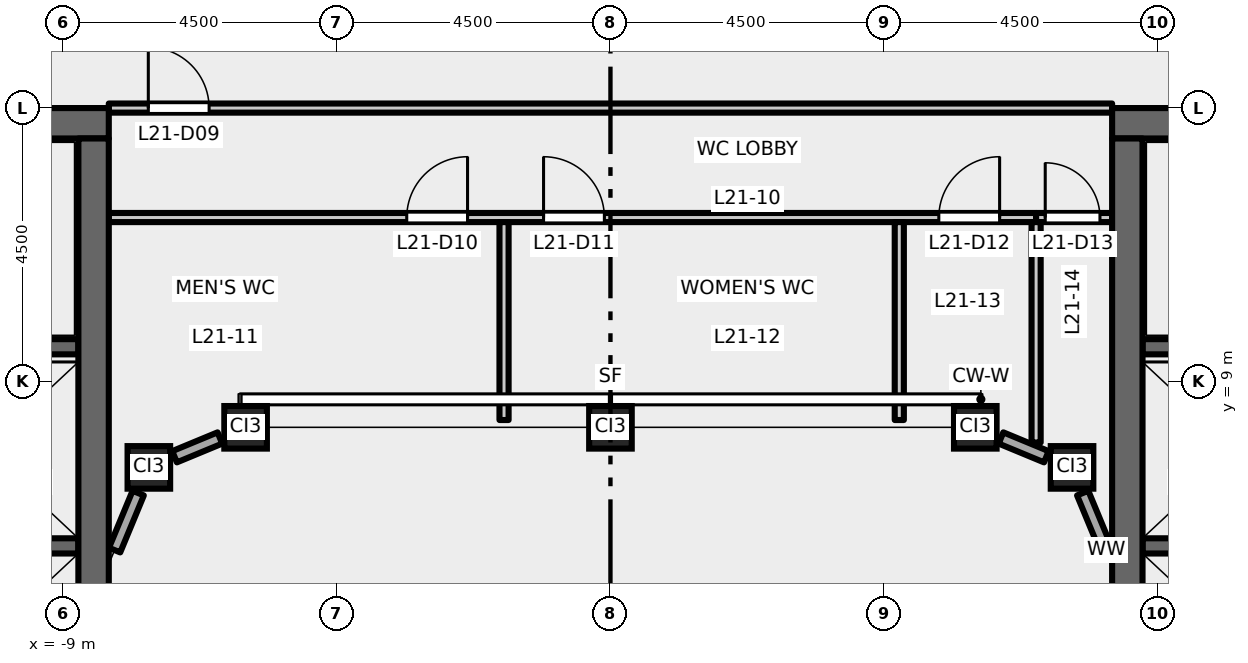
"""IFC4 building model, lengths in metres.
Left out: names, types, materials, properties, quantities, classifications, styles, units other than length and angle.
Written with IfcOpenShell. Run it as: python <this file> out.ifc"""

import sys

from ifc_helpers import new_model, si_unit, direction, frame, frame_2d, origin, origin_2d, place, context, subcontext, project, spatial, rectangle, hollow_rectangle, extrude, element, fill, save


model = new_model("IFC4")
c1 = context("Model", 3, precision=1e-05, world=origin(), true_north=direction((0.0, 1.0)))
c2 = subcontext(c1, "Body", "Model", "MODEL_VIEW")
j1 = project(units=[si_unit("LENGTHUNIT", "METRE"), si_unit("PLANEANGLEUNIT", "RADIAN")], contexts=[c1])
p1 = place(None, origin())
s1 = spatial("IfcSite", under=j1, at=p1, CompositionType="ELEMENT")
p2 = place(p1, origin())
s2 = spatial("IfcBuilding", under=s1, at=p2, CompositionType="ELEMENT")
p3 = place(p2, frame((0.0, 0.0, 99.2)))
s3 = spatial("IfcBuildingStorey", under=s2, at=p3, CompositionType="ELEMENT", Elevation=99.2)
for number, where, z_axis, x_axis in (
    (1, (-7.591, 7.591, 0.0), (0.0, 0.0, 1.0), (1.0, 0.0, 0.0)),
    (2, (-6.0, 8.25, 0.0), (0.0, 0.0, 1.0), (1.0, 0.0, 0.0)),
    (3, (0.0, 8.25, 0.0), (0.0, 0.0, 1.0), (1.0, 0.0, 0.0)),
    (4, (6.0, 8.25, 0.0), (0.0, 0.0, 1.0), (1.0, 0.0, 0.0)),
    (5, (7.591, 7.591, 0.0), (0.0, 0.0, 1.0), (1.0, 0.0, 0.0)),
):
    element("IfcColumn", number, at=place(p3, frame(where, z_axis=z_axis, x_axis=x_axis)), inside=s3, PredefinedType="COLUMN", context=c2, shape_type="SweptSolid", body=[
        extrude(hollow_rectangle(XDim=0.7, YDim=0.7, WallThickness=0.04, at=origin_2d()), origin(), (0.0, 0.0, 1.0), 5.5),
    ])
p4 = place(p3, frame((-8.75, 6.3, 0.0), z_axis=(0.0, 0.0, 1.0), x_axis=(-1.0, 0.0, 0.0)))
e6 = element("IfcWall", 6, at=p4, inside=s3, PredefinedType="SHEAR", context=c2, shape_type="SweptSolid", body=[
    extrude(rectangle(XDim=3.1, YDim=0.25, at=frame_2d((1.55, 0.0))), origin(), (0.0, 0.0, 1.0), 5.35),
])
p5 = place(p3, frame((-8.75, 9.575, 0.0), z_axis=(0.0, 0.0, 1.0), x_axis=(-1.0, 0.0, 0.0)))
e7 = element("IfcWall", 7, at=p5, inside=s3, PredefinedType="SHEAR", context=c2, shape_type="SweptSolid", body=[
    extrude(rectangle(XDim=8.0, YDim=0.25, at=frame_2d((4.0, 0.0))), origin(), (0.0, 0.0, 1.0), 5.35),
])
p6 = place(p5, frame((6.65, 0.0, 0.0)))
e8 = element("IfcOpeningElement", 8, at=p6, cuts=e7, PredefinedType="OPENING", context=c2, shape_type="SweptSolid", body=[
    extrude(rectangle(XDim=1.1, YDim=2.1, at=frame_2d((0.55, 1.05))), frame((0.0, 0.135, 0.0), z_axis=(0.0, -1.0, 0.0), x_axis=(1.0, 0.0, 0.0)), (0.0, 0.0, 1.0), 0.27),
])
p7 = place(p3, frame((-8.25, 13.25, 0.0), z_axis=(0.0, 0.0, 1.0), x_axis=(-1.0, 0.0, 0.0)))
e9 = element("IfcWall", 9, at=p7, inside=s3, PredefinedType="SHEAR", context=c2, shape_type="SweptSolid", body=[
    extrude(rectangle(XDim=13.5, YDim=0.5, at=frame_2d((6.75, 0.0))), origin(), (0.0, 0.0, 1.0), 5.35),
])
p8 = place(p3, frame((-8.5, -13.0, 0.0), z_axis=(0.0, 0.0, 1.0), x_axis=(0.0, 1.0, 0.0)))
e10 = element("IfcWall", 10, at=p8, inside=s3, PredefinedType="SHEAR", context=c2, shape_type="SweptSolid", body=[
    extrude(rectangle(XDim=26.0, YDim=0.5, at=frame_2d((13.0, 0.0))), origin(), (0.0, 0.0, 1.0), 5.35),
])
p9 = place(p3, frame((8.75, 6.3, 0.0), z_axis=(0.0, 0.0, 1.0), x_axis=(1.0, 0.0, 0.0)))
e11 = element("IfcWall", 11, at=p9, inside=s3, PredefinedType="SHEAR", context=c2, shape_type="SweptSolid", body=[
    extrude(rectangle(XDim=3.1, YDim=0.25, at=frame_2d((1.55, 0.0))), origin(), (0.0, 0.0, 1.0), 5.35),
])
p10 = place(p3, frame((8.75, 9.575, 0.0), z_axis=(0.0, 0.0, 1.0), x_axis=(1.0, 0.0, 0.0)))
e12 = element("IfcWall", 12, at=p10, inside=s3, PredefinedType="SHEAR", context=c2, shape_type="SweptSolid", body=[
    extrude(rectangle(XDim=8.0, YDim=0.25, at=frame_2d((4.0, 0.0))), origin(), (0.0, 0.0, 1.0), 5.35),
])
p11 = place(p10, frame((6.65, 0.0, 0.0)))
e13 = element("IfcOpeningElement", 13, at=p11, cuts=e12, PredefinedType="OPENING", context=c2, shape_type="SweptSolid", body=[
    extrude(rectangle(XDim=1.1, YDim=2.1, at=frame_2d((0.55, 1.05))), frame((0.0, 0.135, 0.0), z_axis=(0.0, -1.0, 0.0), x_axis=(1.0, 0.0, 0.0)), (0.0, 0.0, 1.0), 0.27),
])
p12 = place(p3, frame((8.25, 13.25, 0.0), z_axis=(0.0, 0.0, 1.0), x_axis=(1.0, 0.0, 0.0)))
e14 = element("IfcWall", 14, at=p12, inside=s3, PredefinedType="SHEAR", context=c2, shape_type="SweptSolid", body=[
    extrude(rectangle(XDim=13.5, YDim=0.5, at=frame_2d((6.75, 0.0))), origin(), (0.0, 0.0, 1.0), 5.35),
])
p13 = place(p3, frame((8.5, -13.0, 0.0), z_axis=(0.0, 0.0, 1.0), x_axis=(0.0, 1.0, 0.0)))
e15 = element("IfcWall", 15, at=p13, inside=s3, PredefinedType="SHEAR", context=c2, shape_type="SweptSolid", body=[
    extrude(rectangle(XDim=26.0, YDim=0.5, at=frame_2d((13.0, 0.0))), origin(), (0.0, 0.0, 1.0), 5.35),
])
p14 = place(p3, frame((8.154, 6.231, 0.0), z_axis=(0.0, 0.0, 1.0), x_axis=(-0.382769662028, 0.923843810301, 0.0)))
e16 = element("IfcWall", 16, at=p14, inside=s3, PredefinedType="STANDARD", context=c2, shape_type="SweptSolid", body=[
    extrude(rectangle(XDim=1.015, YDim=0.2, at=frame_2d((0.507, 0.0))), origin(), (0.0, 0.0, 1.0), 4.826),
])
for number, where, z_axis, x_axis in (
    (17, (7.168, 7.766, 0.0), (0.0, 0.0, 1.0), (-0.924, 0.383, 0.0)),
    (18, (-6.423, 8.075, 0.0), (0.0, 0.0, 1.0), (-0.924, -0.383, 0.0)),
):
    element("IfcWall", number, at=place(p3, frame(where, z_axis=z_axis, x_axis=x_axis)), inside=s3, PredefinedType="STANDARD", context=c2, shape_type="SweptSolid", body=[
        extrude(rectangle(XDim=0.807, YDim=0.2, at=frame_2d((0.404, 0.0))), origin(), (0.0, 0.0, 1.0), 4.826),
    ])
p15 = place(p3, frame((-7.766, 7.168, 0.0), z_axis=(0.0, 0.0, 1.0), x_axis=(-0.382769662028, -0.923843810301, 0.0)))
e19 = element("IfcWall", 19, at=p15, inside=s3, PredefinedType="STANDARD", context=c2, shape_type="SweptSolid", body=[
    extrude(rectangle(XDim=1.015, YDim=0.2, at=frame_2d((0.507, 0.0))), origin(), (0.0, 0.0, 1.0), 4.826),
])
p16 = place(p3, frame((-8.25, 11.7, 0.0), z_axis=(0.0, 0.0, 1.0), x_axis=(1.0, 0.0, 0.0)))
e20 = element("IfcWall", 20, at=p16, inside=s3, PredefinedType="PARTITIONING", context=c2, shape_type="SweptSolid", body=[
    extrude(rectangle(XDim=15.25, YDim=0.15, at=frame_2d((7.625, 0.0))), origin(), (0.0, 0.0, 1.0), 5.35),
])
p17 = place(p16, frame((4.9, 0.0, 0.0)))
e21 = element("IfcOpeningElement", 21, at=p17, cuts=e20, PredefinedType="OPENING", context=c2, shape_type="SweptSolid", body=[
    extrude(rectangle(XDim=1.0, YDim=2.1, at=frame_2d((0.5, 1.05))), frame((0.0, 0.085, 0.0), z_axis=(0.0, -1.0, 0.0), x_axis=(1.0, 0.0, 0.0)), (0.0, 0.0, 1.0), 0.17),
])
p18 = place(p16, frame((7.15, 0.0, 0.0)))
e22 = element("IfcOpeningElement", 22, at=p18, cuts=e20, PredefinedType="OPENING", context=c2, shape_type="SweptSolid", body=[
    extrude(rectangle(XDim=1.0, YDim=2.1, at=frame_2d((0.5, 1.05))), frame((0.0, 0.085, 0.0), z_axis=(0.0, -1.0, 0.0), x_axis=(1.0, 0.0, 0.0)), (0.0, 0.0, 1.0), 0.17),
])
p19 = place(p16, frame((13.65, 0.0, 0.0)))
e23 = element("IfcOpeningElement", 23, at=p19, cuts=e20, PredefinedType="OPENING", context=c2, shape_type="SweptSolid", body=[
    extrude(rectangle(XDim=1.0, YDim=2.1, at=frame_2d((0.5, 1.05))), frame((0.0, 0.085, 0.0), z_axis=(0.0, -1.0, 0.0), x_axis=(1.0, 0.0, 0.0)), (0.0, 0.0, 1.0), 0.17),
])
p20 = place(p3, frame((7.0, 11.7, 0.0), z_axis=(0.0, 0.0, 1.0), x_axis=(1.0, 0.0, 0.0)))
e24 = element("IfcWall", 24, at=p20, inside=s3, PredefinedType="PARTITIONING", context=c2, shape_type="SweptSolid", body=[
    extrude(rectangle(XDim=1.25, YDim=0.15, at=frame_2d((0.625, 0.0))), origin(), (0.0, 0.0, 1.0), 5.35),
])
p21 = place(p20, frame((0.15, 0.0, 0.0)))
e25 = element("IfcOpeningElement", 25, at=p21, cuts=e24, PredefinedType="OPENING", context=c2, shape_type="SweptSolid", body=[
    extrude(rectangle(XDim=0.9, YDim=2.1, at=frame_2d((0.45, 1.05))), frame((0.0, 0.085, 0.0), z_axis=(0.0, -1.0, 0.0), x_axis=(1.0, 0.0, 0.0)), (0.0, 0.0, 1.0), 0.17),
])
p22 = place(p3, frame((-8.25, 13.5, 0.0), z_axis=(0.0, 0.0, 1.0), x_axis=(1.0, 0.0, 0.0)))
e26 = element("IfcWall", 26, at=p22, inside=s3, PredefinedType="PARTITIONING", context=c2, shape_type="SweptSolid", body=[
    extrude(rectangle(XDim=16.5, YDim=0.15, at=frame_2d((8.25, 0.0))), origin(), (0.0, 0.0, 1.0), 5.35),
])
p23 = place(p22, frame((0.65, 0.0, 0.0)))
e27 = element("IfcOpeningElement", 27, at=p23, cuts=e26, PredefinedType="OPENING", context=c2, shape_type="SweptSolid", body=[
    extrude(rectangle(XDim=1.0, YDim=2.1, at=frame_2d((0.5, 1.05))), frame((0.0, 0.085, 0.0), z_axis=(0.0, -1.0, 0.0), x_axis=(1.0, 0.0, 0.0)), (0.0, 0.0, 1.0), 0.17),
])
for number, where, z_axis, x_axis in (
    (28, (-1.75, 8.37, 0.0), (0.0, 0.0, 1.0), (0.0, 1.0, 0.0)),
    (29, (4.75, 8.37, 0.0), (0.0, 0.0, 1.0), (0.0, 1.0, 0.0)),
):
    element("IfcWall", number, at=place(p3, frame(where, z_axis=z_axis, x_axis=x_axis)), inside=s3, PredefinedType="PARTITIONING", context=c2, shape_type="SweptSolid", body=[
        extrude(rectangle(XDim=3.255, YDim=0.15, at=frame_2d((1.627, 0.0))), origin(), (0.0, 0.0, 1.0), 5.35),
    ])
p24 = place(p3, frame((7.0, 8.0, 0.0), z_axis=(0.0, 0.0, 1.0), x_axis=(0.0, 1.0, 0.0)))
e30 = element("IfcWall", 30, at=p24, inside=s3, PredefinedType="PARTITIONING", context=c2, shape_type="SweptSolid", body=[
    extrude(rectangle(XDim=3.625, YDim=0.15, at=frame_2d((1.812, 0.0))), origin(), (0.0, 0.0, 1.0), 5.35),
])
p25 = place(p23, origin())
e31 = element("IfcDoor", 31, at=p25, inside=s3, OperationType="SINGLE_SWING_LEFT", PredefinedType="DOOR", context=c2, shape_type="SweptSolid", body=[
    extrude(rectangle(XDim=1.0, YDim=2.1, at=frame_2d((0.5, 1.05))), frame((0.0, 0.025, 0.0), z_axis=(0.0, -1.0, 0.0), x_axis=(1.0, 0.0, 0.0)), (0.0, 0.0, 1.0), 0.05),
])
fill(e27, e31)
p26 = place(p17, origin())
e32 = element("IfcDoor", 32, at=p26, inside=s3, OperationType="SINGLE_SWING_RIGHT", PredefinedType="DOOR", context=c2, shape_type="SweptSolid", body=[
    extrude(rectangle(XDim=1.0, YDim=2.1, at=frame_2d((0.5, 1.05))), frame((0.0, 0.025, 0.0), z_axis=(0.0, -1.0, 0.0), x_axis=(1.0, 0.0, 0.0)), (0.0, 0.0, 1.0), 0.05),
])
fill(e21, e32)
p27 = place(p18, origin())
e33 = element("IfcDoor", 33, at=p27, inside=s3, OperationType="SINGLE_SWING_LEFT", PredefinedType="DOOR", context=c2, shape_type="SweptSolid", body=[
    extrude(rectangle(XDim=1.0, YDim=2.1, at=frame_2d((0.5, 1.05))), frame((0.0, 0.025, 0.0), z_axis=(0.0, -1.0, 0.0), x_axis=(1.0, 0.0, 0.0)), (0.0, 0.0, 1.0), 0.05),
])
fill(e22, e33)
p28 = place(p19, origin())
e34 = element("IfcDoor", 34, at=p28, inside=s3, OperationType="SINGLE_SWING_RIGHT", PredefinedType="DOOR", context=c2, shape_type="SweptSolid", body=[
    extrude(rectangle(XDim=1.0, YDim=2.1, at=frame_2d((0.5, 1.05))), frame((0.0, 0.025, 0.0), z_axis=(0.0, -1.0, 0.0), x_axis=(1.0, 0.0, 0.0)), (0.0, 0.0, 1.0), 0.05),
])
fill(e23, e34)
p29 = place(p21, origin())
e35 = element("IfcDoor", 35, at=p29, inside=s3, OperationType="SINGLE_SWING_LEFT", PredefinedType="DOOR", context=c2, shape_type="SweptSolid", body=[
    extrude(rectangle(XDim=0.9, YDim=2.1, at=frame_2d((0.45, 1.05))), frame((0.0, 0.025, 0.0), z_axis=(0.0, -1.0, 0.0), x_axis=(1.0, 0.0, 0.0)), (0.0, 0.0, 1.0), 0.05),
])
fill(e25, e35)
save(model, sys.argv[1])
